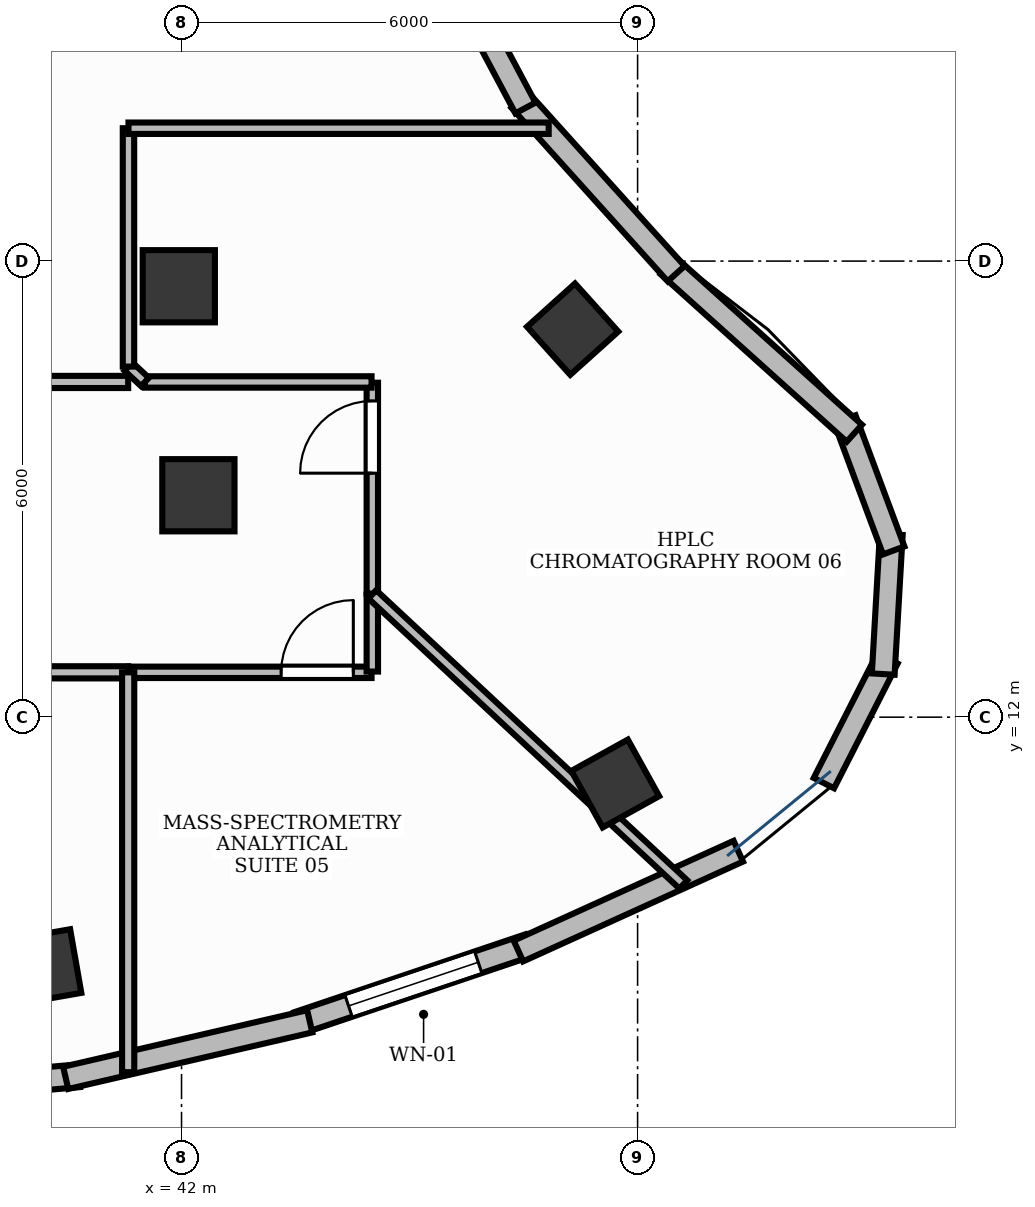
"""IFC4 building model, lengths in metres.
Left out: names, types, materials, properties, quantities, classifications, styles, units other than length and angle.
Written with IfcOpenShell. Run it as: python <this file> out.ifc"""

import sys

from ifc_helpers import new_model, si_unit, direction, frame, frame_2d, origin, origin_2d, place, context, subcontext, project, spatial, rectangle, extrude, element, fill, save


model = new_model("IFC4")
c1 = context("Model", 3, precision=1e-05, world=origin(), true_north=direction((0.0, 1.0)))
c2 = subcontext(c1, "Body", "Model", "MODEL_VIEW")
j1 = project(units=[si_unit("LENGTHUNIT", "METRE"), si_unit("PLANEANGLEUNIT", "RADIAN")], contexts=[c1])
p1 = place(None, origin())
s1 = spatial("IfcSite", under=j1, at=p1, CompositionType="ELEMENT")
p2 = place(p1, origin())
s2 = spatial("IfcBuilding", under=s1, at=p2, CompositionType="ELEMENT")
p3 = place(p2, frame((0.0, 0.0, 264.6)))
s3 = spatial("IfcBuildingStorey", under=s2, at=p3, CompositionType="ELEMENT", Elevation=264.6)
for number, where, z_axis, x_axis in (
    (1, (40.189, 8.718, -0.0), (0.0, 0.0, 1.0), (0.985, 0.173, 0.0)),
    (2, (47.706, 11.127, -0.0), (0.0, 0.0, 1.0), (0.875, 0.485, 0.0)),
):
    element("IfcColumn", number, at=place(p3, frame(where, z_axis=z_axis, x_axis=x_axis)), inside=s3, PredefinedType="COLUMN", context=c2, shape_type="SweptSolid", body=[
        extrude(rectangle(XDim=0.85, YDim=0.85, at=origin_2d()), origin(), (0.0, 0.0, 1.0), 3.901),
    ])
p4 = place(p3, frame((42.222, 14.919, -0.0), z_axis=(0.0, 0.0, 1.0), x_axis=(1.0, 0.0, 0.0)))
e3 = element("IfcColumn", 3, at=p4, inside=s3, PredefinedType="COLUMN", context=c2, shape_type="SweptSolid", body=[
    extrude(rectangle(XDim=0.95, YDim=0.95, at=origin_2d()), origin(), (0.0, 0.0, 1.0), 3.901),
])
p5 = place(p3, frame((47.146, 17.104, -0.0), z_axis=(0.0, 0.0, 1.0), x_axis=(-0.669130606359, 0.743144825477, 0.0)))
e4 = element("IfcColumn", 4, at=p5, inside=s3, PredefinedType="COLUMN", context=c2, shape_type="SweptSolid", body=[
    extrude(rectangle(XDim=0.85, YDim=0.85, at=origin_2d()), origin(), (0.0, 0.0, 1.0), 3.901),
])
p6 = place(p3, frame((41.964, 17.669, -0.0), z_axis=(0.0, 0.0, 1.0), x_axis=(1.0, 0.0, 0.0)))
e5 = element("IfcColumn", 5, at=p6, inside=s3, PredefinedType="COLUMN", context=c2, shape_type="SweptSolid", body=[
    extrude(rectangle(XDim=0.95, YDim=0.95, at=origin_2d()), origin(), (0.0, 0.0, 1.0), 3.901),
])
p7 = place(p3, frame((43.532, 7.977, 0.0), z_axis=(0.0, 0.0, 1.0), x_axis=(0.947657235502, 0.319289467413, 0.0)))
e6 = element("IfcWall", 6, at=p7, inside=s3, PredefinedType="STANDARD", context=c2, shape_type="SweptSolid", body=[
    extrude(rectangle(XDim=3.204, YDim=0.3, at=frame_2d((1.602, 0.0))), origin(), (0.0, 0.0, 1.0), 3.9),
])
p8 = place(p7, frame((0.702, 0.0, 0.9)))
e7 = element("IfcOpeningElement", 7, at=p8, cuts=e6, PredefinedType="OPENING", context=c2, shape_type="SweptSolid", body=[
    extrude(rectangle(XDim=1.8, YDim=2.1, at=frame_2d((0.9, 1.05))), frame((0.0, 0.165, 0.0), z_axis=(0.0, -1.0, 0.0), x_axis=(1.0, 0.0, 0.0)), (0.0, 0.0, 1.0), 0.33),
])
p9 = place(p3, frame((34.164, 6.719, 0.0), z_axis=(0.0, 0.0, 1.0), x_axis=(0.996250708408, 0.086513155053, 0.0)))
e8 = element("IfcWall", 8, at=p9, inside=s3, PredefinedType="STANDARD", context=c2, shape_type="SweptSolid", body=[
    extrude(rectangle(XDim=6.513, YDim=0.3, at=frame_2d((3.257, 0.0))), origin(), (0.0, 0.0, 1.0), 3.9),
])
p10 = place(p3, frame((40.476, 7.255, 0.0), z_axis=(0.0, 0.0, 1.0), x_axis=(0.974177266996, 0.225784526637, 0.0)))
e9 = element("IfcWall", 9, at=p10, inside=s3, PredefinedType="STANDARD", context=c2, shape_type="SweptSolid", body=[
    extrude(rectangle(XDim=3.296, YDim=0.3, at=frame_2d((1.648, 0.0))), origin(), (0.0, 0.0, 1.0), 3.9),
])
p11 = place(p3, frame((46.432, 8.923, 0.0), z_axis=(0.0, 0.0, 1.0), x_axis=(0.910592641424, 0.413305022211, 0.0)))
e10 = element("IfcWall", 10, at=p11, inside=s3, PredefinedType="STANDARD", context=c2, shape_type="SweptSolid", body=[
    extrude(rectangle(XDim=3.177, YDim=0.3, at=frame_2d((1.589, 0.0))), origin(), (0.0, 0.0, 1.0), 3.9),
])
for number, where, z_axis, x_axis in (
    (11, (50.451, 11.133, 0.0), (0.0, 0.0, 1.0), (0.454, 0.891, 0.0)),
    (12, (51.232, 12.567, 0.0), (0.0, 0.0, 1.0), (0.057, 0.998, 0.0)),
    (13, (51.369, 14.194, 0.0), (0.0, 0.0, 1.0), (-0.349, 0.937, 0.0)),
):
    element("IfcWall", number, at=place(p3, frame(where, z_axis=z_axis, x_axis=x_axis)), inside=s3, PredefinedType="STANDARD", context=c2, shape_type="SweptSolid", body=[
        extrude(rectangle(XDim=1.842, YDim=0.3, at=frame_2d((0.921, 0.0))), origin(), (0.0, 0.0, 1.0), 3.9),
    ])
p12 = place(p3, frame((50.852, 15.736, 0.0), z_axis=(0.0, 0.0, 1.0), x_axis=(-0.743397410822, 0.668849975393, 0.0)))
e14 = element("IfcWall", 14, at=p12, inside=s3, PredefinedType="STANDARD", context=c2, shape_type="SweptSolid", body=[
    extrude(rectangle(XDim=3.291, YDim=0.3, at=frame_2d((1.646, 0.0))), origin(), (0.0, 0.0, 1.0), 3.9),
])
p13 = place(p3, frame((48.508, 17.835, 0.0), z_axis=(0.0, 0.0, 1.0), x_axis=(-0.669127242861, 0.743147853971, 0.0)))
e15 = element("IfcWall", 15, at=p13, inside=s3, PredefinedType="STANDARD", context=c2, shape_type="SweptSolid", body=[
    extrude(rectangle(XDim=3.071, YDim=0.3, at=frame_2d((1.535, 0.0))), origin(), (0.0, 0.0, 1.0), 3.9),
])
p14 = place(p3, frame((46.524, 20.014, 0.0), z_axis=(0.0, 0.0, 1.0), x_axis=(-0.469494296004, 0.882935505017, 0.0)))
e16 = element("IfcWall", 16, at=p14, inside=s3, PredefinedType="STANDARD", context=c2, shape_type="SweptSolid", body=[
    extrude(rectangle(XDim=3.071, YDim=0.3, at=frame_2d((1.535, 0.0))), origin(), (0.0, 0.0, 1.0), 3.9),
])
p15 = place(p3, frame((29.765, 12.59, 0.0), z_axis=(0.0, 0.0, 1.0), x_axis=(1.0, 0.0, 0.0)))
e17 = element("IfcWall", 17, at=p15, inside=s3, PredefinedType="PARTITIONING", context=c2, shape_type="SweptSolid", body=[
    extrude(rectangle(XDim=11.533, YDim=0.16, at=frame_2d((5.767, 0.0))), origin(), (0.0, 0.0, 1.0), 2.91),
])
p16 = place(p15, frame((0.24, 0.0, 0.0)))
e18 = element("IfcOpeningElement", 18, at=p16, cuts=e17, PredefinedType="OPENING", context=c2, shape_type="SweptSolid", body=[
    extrude(rectangle(XDim=0.95, YDim=2.15, at=frame_2d((0.475, 1.075))), frame((0.0, 0.095, 0.0), z_axis=(0.0, -1.0, 0.0), x_axis=(1.0, 0.0, 0.0)), (0.0, 0.0, 1.0), 0.19),
])
p17 = place(p3, frame((41.308, 12.59, 0.0), z_axis=(0.0, 0.0, 1.0), x_axis=(1.0, 0.0, 0.0)))
e19 = element("IfcWall", 19, at=p17, inside=s3, PredefinedType="PARTITIONING", context=c2, shape_type="SweptSolid", body=[
    extrude(rectangle(XDim=3.192, YDim=0.15, at=frame_2d((1.596, 0.0))), origin(), (0.0, 0.0, 1.0), 2.91),
])
p18 = place(p17, frame((2.002, 0.0, 0.0)))
e20 = element("IfcOpeningElement", 20, at=p18, cuts=e19, PredefinedType="OPENING", context=c2, shape_type="SweptSolid", body=[
    extrude(rectangle(XDim=0.95, YDim=2.15, at=frame_2d((0.475, 1.075))), frame((0.0, 0.09, 0.0), z_axis=(0.0, -1.0, 0.0), x_axis=(1.0, 0.0, 0.0)), (0.0, 0.0, 1.0), 0.18),
])
p19 = place(p3, frame((44.51, 13.625, 0.0), z_axis=(0.0, 0.0, 1.0), x_axis=(0.0, 1.0, 0.0)))
e21 = element("IfcWall", 21, at=p19, inside=s3, PredefinedType="PARTITIONING", context=c2, shape_type="SweptSolid", body=[
    extrude(rectangle(XDim=2.775, YDim=0.15, at=frame_2d((1.387, 0.0))), origin(), (0.0, 0.0, 1.0), 2.91),
])
p20 = place(p19, frame((1.585, 0.0, 0.0)))
e22 = element("IfcOpeningElement", 22, at=p20, cuts=e21, PredefinedType="OPENING", context=c2, shape_type="SweptSolid", body=[
    extrude(rectangle(XDim=0.95, YDim=2.15, at=frame_2d((0.475, 1.075))), frame((0.0, 0.09, 0.0), z_axis=(0.0, -1.0, 0.0), x_axis=(1.0, 0.0, 0.0)), (0.0, 0.0, 1.0), 0.18),
])
p21 = place(p3, frame((41.298, 16.41, 0.0), z_axis=(0.0, 0.0, 1.0), x_axis=(-1.0, 0.0, 0.0)))
e23 = element("IfcWall", 23, at=p21, inside=s3, PredefinedType="PARTITIONING", context=c2, shape_type="SweptSolid", body=[
    extrude(rectangle(XDim=7.838, YDim=0.16, at=frame_2d((3.919, 0.0))), origin(), (0.0, 0.0, 1.0), 2.91),
])
p22 = place(p21, frame((6.648, 0.0, 0.0)))
e24 = element("IfcOpeningElement", 24, at=p22, cuts=e23, PredefinedType="OPENING", context=c2, shape_type="SweptSolid", body=[
    extrude(rectangle(XDim=0.95, YDim=2.15, at=frame_2d((0.475, 1.075))), frame((0.0, 0.095, 0.0), z_axis=(0.0, -1.0, 0.0), x_axis=(1.0, 0.0, 0.0)), (0.0, 0.0, 1.0), 0.19),
])
p23 = place(p3, frame((41.298, 12.59, 0.0), z_axis=(0.0, 0.0, 1.0), x_axis=(0.0, -1.0, 0.0)))
e25 = element("IfcWall", 25, at=p23, inside=s3, PredefinedType="PARTITIONING", context=c2, shape_type="SweptSolid", body=[
    extrude(rectangle(XDim=5.261, YDim=0.16, at=frame_2d((2.63, 0.0))), origin(), (0.0, 0.0, 1.0), 2.91),
])
p24 = place(p3, frame((44.51, 12.6, 0.0), z_axis=(0.0, 0.0, 1.0), x_axis=(0.0, 1.0, 0.0)))
e26 = element("IfcWall", 26, at=p24, inside=s3, PredefinedType="PARTITIONING", context=c2, shape_type="SweptSolid", body=[
    extrude(rectangle(XDim=1.015, YDim=0.15, at=frame_2d((0.508, 0.0))), origin(), (0.0, 0.0, 1.0), 2.91),
])
p25 = place(p3, frame((44.51, 13.615, 0.0), z_axis=(0.0, 0.0, 1.0), x_axis=(0.731351206573, -0.682001035662, 0.0)))
e27 = element("IfcWall", 27, at=p25, inside=s3, PredefinedType="PARTITIONING", context=c2, shape_type="SweptSolid", body=[
    extrude(rectangle(XDim=5.595, YDim=0.15, at=frame_2d((2.798, 0.0))), origin(), (0.0, 0.0, 1.0), 2.91),
])
p26 = place(p3, frame((44.5, 16.41, 0.0), z_axis=(0.0, 0.0, 1.0), x_axis=(-1.0, 0.0, 0.0)))
e28 = element("IfcWall", 28, at=p26, inside=s3, PredefinedType="PARTITIONING", context=c2, shape_type="SweptSolid", body=[
    extrude(rectangle(XDim=2.981, YDim=0.15, at=frame_2d((1.491, 0.0))), origin(), (0.0, 0.0, 1.0), 2.91),
])
p27 = place(p3, frame((41.519, 16.41, 0.0), z_axis=(0.0, 0.0, 1.0), x_axis=(-0.73097314168, 0.682406232491, 0.0)))
e29 = element("IfcWall", 29, at=p27, inside=s3, PredefinedType="PARTITIONING", context=c2, shape_type="SweptSolid", body=[
    extrude(rectangle(XDim=0.297, YDim=0.15, at=frame_2d((0.148, 0.0))), origin(), (0.0, 0.0, 1.0), 2.91),
])
p28 = place(p3, frame((41.302, 16.612, 0.0), z_axis=(0.0, 0.0, 1.0), x_axis=(0.0, 1.0, 0.0)))
e30 = element("IfcWall", 30, at=p28, inside=s3, PredefinedType="PARTITIONING", context=c2, shape_type="SweptSolid", body=[
    extrude(rectangle(XDim=3.136, YDim=0.15, at=frame_2d((1.568, 0.0))), origin(), (0.0, 0.0, 1.0), 2.91),
])
p29 = place(p3, frame((41.302, 19.748, 0.0), z_axis=(0.0, 0.0, 1.0), x_axis=(1.0, 0.0, 0.0)))
e31 = element("IfcWall", 31, at=p29, inside=s3, PredefinedType="PARTITIONING", context=c2, shape_type="SweptSolid", body=[
    extrude(rectangle(XDim=5.528, YDim=0.15, at=frame_2d((2.764, 0.0))), origin(), (0.0, 0.0, 1.0), 2.91),
])
p30 = place(p8, origin())
e32 = element("IfcWindow", 32, at=p30, inside=s3, PartitioningType="SINGLE_PANEL", PredefinedType="WINDOW", context=c2, shape_type="SweptSolid", body=[
    extrude(rectangle(XDim=1.8, YDim=2.1, at=frame_2d((0.9, 1.05))), frame((0.0, 0.03, 0.0), z_axis=(0.0, -1.0, 0.0), x_axis=(1.0, 0.0, 0.0)), (0.0, 0.0, 1.0), 0.06),
])
fill(e7, e32)
p31 = place(p18, origin())
e33 = element("IfcDoor", 33, at=p31, inside=s3, OperationType="SINGLE_SWING_RIGHT", PredefinedType="DOOR", context=c2, shape_type="SweptSolid", body=[
    extrude(rectangle(XDim=0.95, YDim=2.15, at=frame_2d((0.475, 1.075))), frame((0.0, 0.025, 0.0), z_axis=(0.0, -1.0, 0.0), x_axis=(1.0, 0.0, 0.0)), (0.0, 0.0, 1.0), 0.05),
])
fill(e20, e33)
p32 = place(p20, origin())
e34 = element("IfcDoor", 34, at=p32, inside=s3, OperationType="SINGLE_SWING_LEFT", PredefinedType="DOOR", context=c2, shape_type="SweptSolid", body=[
    extrude(rectangle(XDim=0.95, YDim=2.15, at=frame_2d((0.475, 1.075))), frame((0.0, 0.025, 0.0), z_axis=(0.0, -1.0, 0.0), x_axis=(1.0, 0.0, 0.0)), (0.0, 0.0, 1.0), 0.05),
])
fill(e22, e34)
save(model, sys.argv[1])
